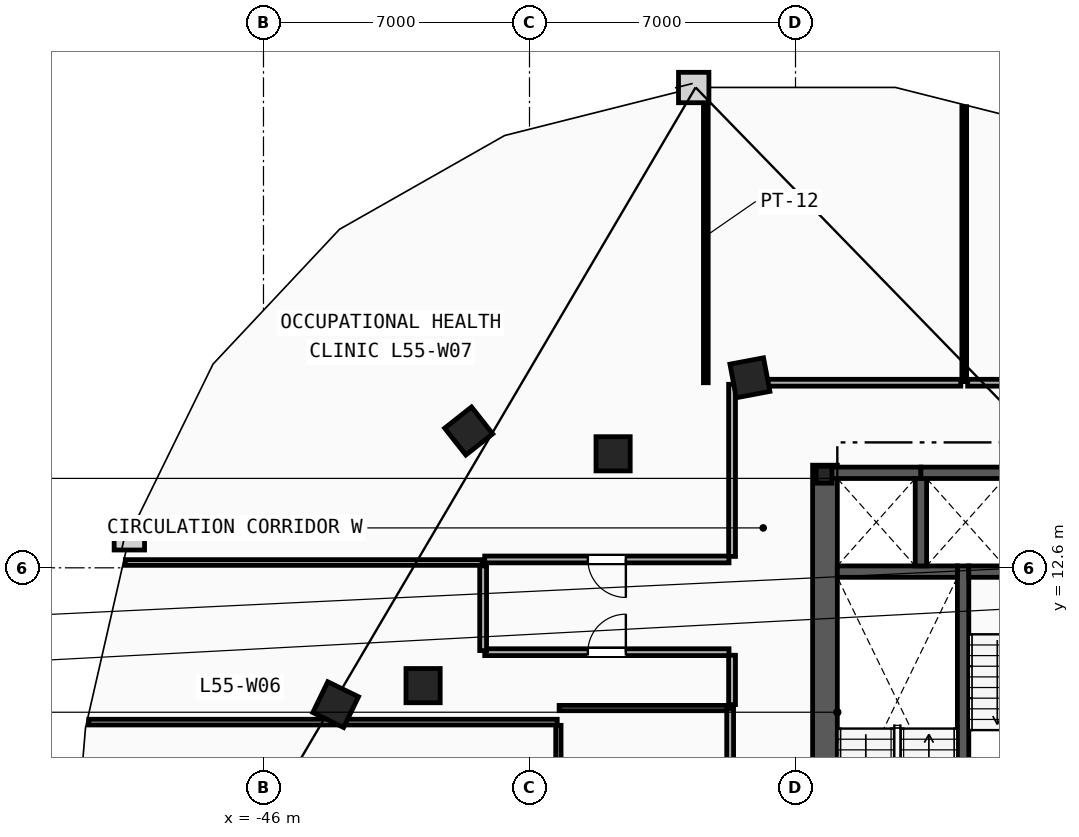
"""IFC4 building model, lengths in metres.
Left out: names, types, materials, properties, quantities, classifications, styles, units other than length and angle.
Written with IfcOpenShell. Run it as: python <this file> out.ifc"""

import sys

from ifc_helpers import new_model, si_unit, direction, frame, frame_2d, origin, origin_2d, place, context, subcontext, project, spatial, rectangle, i_section, extrude, element, fill, save


model = new_model("IFC4")
c1 = context("Model", 3, precision=1e-05, world=origin(), true_north=direction((0.0, 1.0)))
c2 = subcontext(c1, "Body", "Model", "MODEL_VIEW")
j1 = project(units=[si_unit("LENGTHUNIT", "METRE"), si_unit("PLANEANGLEUNIT", "RADIAN")], contexts=[c1])
p1 = place(None, origin())
s1 = spatial("IfcSite", under=j1, at=p1, CompositionType="ELEMENT")
p2 = place(p1, origin())
s2 = spatial("IfcBuilding", under=s1, at=p2, CompositionType="ELEMENT")
p3 = place(p2, frame((0.0, 0.0, 209.8)))
s3 = spatial("IfcBuildingStorey", under=s2, at=p3, CompositionType="ELEMENT", Elevation=209.8)
p4 = place(p3, frame((-31.25, 15.05, 0.0), z_axis=(0.0, 0.0, 1.0), x_axis=(1.0, 0.0, 0.0)))
e1 = element("IfcColumn", 1, at=p4, inside=s3, PredefinedType="COLUMN", context=c2, shape_type="SweptSolid", body=[
    extrude(i_section(OverallWidth=0.416, OverallDepth=0.446, WebThickness=0.039, FlangeThickness=0.063, FilletRadius=0.018, at=origin_2d()), origin(), (0.0, 0.0, 1.0), 3.6),
])
for number, where, z_axis, x_axis in (
    (2, (-41.8, 9.5, 0.0), (0.0, 0.0, 1.0), (1.0, 0.0, 0.0)),
    (3, (-36.8, 15.6, 0.0), (0.0, 0.0, 1.0), (1.0, 0.0, 0.0)),
    (4, (-33.2, 17.6, 0.0), (0.0, 0.0, 1.0), (-0.983, -0.186, 0.0)),
    (5, (-40.6, 16.2, 0.0), (0.0, 0.0, 1.0), (-0.785, -0.619, 0.0)),
    (6, (-44.1, 9.0, 0.0), (0.0, 0.0, 1.0), (-0.437, -0.899, 0.0)),
):
    element("IfcColumn", number, at=place(p3, frame(where, z_axis=z_axis, x_axis=x_axis)), inside=s3, PredefinedType="COLUMN", context=c2, shape_type="SweptSolid", body=[
        extrude(rectangle(XDim=0.9, YDim=0.9, at=origin_2d()), origin(), (0.0, 0.0, 1.0), 3.6),
    ])
p5 = place(p3, frame((-31.225, 1.97, 0.0), z_axis=(0.0, 0.0, 1.0), x_axis=(0.0, 1.0, 0.0)))
e7 = element("IfcWall", 7, at=p5, inside=s3, PredefinedType="SHEAR", context=c2, shape_type="SweptSolid", body=[
    extrude(rectangle(XDim=13.33, YDim=0.65, at=frame_2d((6.665, 0.0))), origin(), (0.0, 0.0, 1.0), 3.34),
])
p6 = place(p3, frame((-27.59, 1.97, 0.0), z_axis=(0.0, 0.0, 1.0), x_axis=(0.0, 1.0, 0.0)))
e8 = element("IfcWall", 8, at=p6, inside=s3, PredefinedType="SHEAR", context=c2, shape_type="SweptSolid", body=[
    extrude(rectangle(XDim=10.68, YDim=0.3, at=frame_2d((5.34, 0.0))), origin(), (0.0, 0.0, 1.0), 3.34),
])
p7 = place(p3, frame((-30.9, 12.5, 0.0), z_axis=(0.0, 0.0, 1.0), x_axis=(1.0, 0.0, 0.0)))
e9 = element("IfcWall", 9, at=p7, inside=s3, PredefinedType="SHEAR", context=c2, shape_type="SweptSolid", body=[
    extrude(rectangle(XDim=3.16, YDim=0.3, at=frame_2d((1.58, 0.0))), origin(), (0.0, 0.0, 1.0), 3.34),
])
p8 = place(p3, frame((-27.44, 12.5, 0.0), z_axis=(0.0, 0.0, 1.0), x_axis=(1.0, 0.0, 0.0)))
e10 = element("IfcWall", 10, at=p8, inside=s3, PredefinedType="SHEAR", context=c2, shape_type="SweptSolid", body=[
    extrude(rectangle(XDim=3.16, YDim=0.3, at=frame_2d((1.58, 0.0))), origin(), (0.0, 0.0, 1.0), 3.34),
])
p9 = place(p8, frame((1.03, 0.0, 0.0)))
e11 = element("IfcOpeningElement", 11, at=p9, cuts=e10, PredefinedType="OPENING", context=c2, shape_type="SweptSolid", body=[
    extrude(rectangle(XDim=1.1, YDim=2.15, at=frame_2d((0.55, 1.075))), frame((0.0, 0.16, 0.0), z_axis=(0.0, -1.0, 0.0), x_axis=(1.0, 0.0, 0.0)), (0.0, 0.0, 1.0), 0.32),
])
p10 = place(p3, frame((-31.2, 15.1, 0.0), z_axis=(0.0, 0.0, 1.0), x_axis=(1.0, 0.0, 0.0)))
e12 = element("IfcWall", 12, at=p10, inside=s3, PredefinedType="SHEAR", context=c2, shape_type="SweptSolid", body=[
    extrude(rectangle(XDim=2.5, YDim=0.3, at=frame_2d((1.25, 0.0))), origin(), (0.0, 0.0, 1.0), 3.34),
])
p11 = place(p3, frame((-28.7, 12.65, 0.0), z_axis=(0.0, 0.0, 1.0), x_axis=(0.0, 1.0, 0.0)))
e13 = element("IfcWall", 13, at=p11, inside=s3, PredefinedType="SHEAR", context=c2, shape_type="SweptSolid", body=[
    extrude(rectangle(XDim=2.3, YDim=0.3, at=frame_2d((1.15, 0.0))), origin(), (0.0, 0.0, 1.0), 3.34),
])
p12 = place(p3, frame((-28.7, 15.1, 0.0), z_axis=(0.0, 0.0, 1.0), x_axis=(1.0, 0.0, 0.0)))
e14 = element("IfcWall", 14, at=p12, inside=s3, PredefinedType="SHEAR", context=c2, shape_type="SweptSolid", body=[
    extrude(rectangle(XDim=2.5, YDim=0.3, at=frame_2d((1.25, 0.0))), origin(), (0.0, 0.0, 1.0), 3.34),
])
p13 = place(p3, frame((-38.24, 4.715, 0.0), z_axis=(0.0, 0.0, 1.0), x_axis=(0.0, 1.0, 0.0)))
e15 = element("IfcWall", 15, at=p13, inside=s3, PredefinedType="PARTITIONING", context=c2, shape_type="SweptSolid", body=[
    extrude(rectangle(XDim=3.74, YDim=0.14, at=frame_2d((1.87, 0.0))), origin(), (0.0, 0.0, 1.0), 3.34),
])
p14 = place(p3, frame((-38.22, 8.91, 0.0), z_axis=(0.0, 0.0, 1.0), x_axis=(1.0, 0.0, 0.0)))
e16 = element("IfcWall", 16, at=p14, inside=s3, PredefinedType="PARTITIONING", context=c2, shape_type="SweptSolid", body=[
    extrude(rectangle(XDim=4.48, YDim=0.14, at=frame_2d((2.24, 0.0))), origin(), (0.0, 0.0, 1.0), 3.34),
])
p15 = place(p3, frame((-33.72, 4.73, 0.0), z_axis=(0.0, 0.0, 1.0), x_axis=(0.0, 1.0, 0.0)))
e17 = element("IfcWall", 17, at=p15, inside=s3, PredefinedType="PARTITIONING", context=c2, shape_type="SweptSolid", body=[
    extrude(rectangle(XDim=4.16, YDim=0.18, at=frame_2d((2.08, 0.0))), origin(), (0.0, 0.0, 1.0), 3.34),
])
p16 = place(p15, frame((1.58, 0.0, 0.0)))
e18 = element("IfcOpeningElement", 18, at=p16, cuts=e17, PredefinedType="OPENING", context=c2, shape_type="SweptSolid", body=[
    extrude(rectangle(XDim=1.0, YDim=2.15, at=frame_2d((0.5, 1.075))), frame((0.0, 0.1, 0.0), z_axis=(0.0, -1.0, 0.0), x_axis=(1.0, 0.0, 0.0)), (0.0, 0.0, 1.0), 0.2),
])
p17 = place(p3, frame((-50.598, 8.54, 0.0), z_axis=(0.0, 0.0, 1.0), x_axis=(1.0, 0.0, 0.0)))
e19 = element("IfcWall", 19, at=p17, inside=s3, PredefinedType="PARTITIONING", context=c2, shape_type="SweptSolid", body=[
    extrude(rectangle(XDim=12.328, YDim=0.15, at=frame_2d((6.164, 0.0))), origin(), (0.0, 0.0, 1.0), 3.34),
])
p18 = place(p3, frame((-49.635, 12.74, 0.0), z_axis=(0.0, 0.0, 1.0), x_axis=(1.0, 0.0, 0.0)))
e20 = element("IfcWall", 20, at=p18, inside=s3, PredefinedType="PARTITIONING", context=c2, shape_type="SweptSolid", body=[
    extrude(rectangle(XDim=9.385, YDim=0.15, at=frame_2d((4.693, 0.0))), origin(), (0.0, 0.0, 1.0), 3.34),
])
p19 = place(p3, frame((-34.36, 17.47, 0.0), z_axis=(0.0, 0.0, 1.0), x_axis=(0.0, 1.0, 0.0)))
e21 = element("IfcWall", 21, at=p19, inside=s3, PredefinedType="PARTITIONING", context=c2, shape_type="SweptSolid", body=[
    extrude(rectangle(XDim=7.72, YDim=0.125, at=frame_2d((3.86, 0.0))), origin(), (0.0, 0.0, 1.0), 3.34),
])
p20 = place(p3, frame((-27.56, 17.5, 0.0), z_axis=(0.0, 0.0, 1.0), x_axis=(0.0, 1.0, 0.0)))
e22 = element("IfcWall", 22, at=p20, inside=s3, PredefinedType="PARTITIONING", context=c2, shape_type="SweptSolid", body=[
    extrude(rectangle(XDim=7.233, YDim=0.125, at=frame_2d((3.617, 0.0))), origin(), (0.0, 0.0, 1.0), 3.34),
])
p21 = place(p3, frame((-16.822, 17.47, 0.0), z_axis=(0.0, 0.0, 1.0), x_axis=(-1.0, 0.0, 0.0)))
e23 = element("IfcWall", 23, at=p21, inside=s3, PredefinedType="PARTITIONING", context=c2, shape_type="SweptSolid", body=[
    extrude(rectangle(XDim=10.648, YDim=0.18, at=frame_2d((5.324, 0.0))), origin(), (0.0, 0.0, 1.0), 3.34),
])
p22 = place(p21, frame((4.824, 0.0, 0.0)))
e24 = element("IfcOpeningElement", 24, at=p22, cuts=e23, PredefinedType="OPENING", context=c2, shape_type="SweptSolid", body=[
    extrude(rectangle(XDim=1.0, YDim=2.15, at=frame_2d((0.5, 1.075))), frame((0.0, 0.1, 0.0), z_axis=(0.0, -1.0, 0.0), x_axis=(1.0, 0.0, 0.0)), (0.0, 0.0, 1.0), 0.2),
])
p23 = place(p3, frame((-40.178, 10.38, 0.0), z_axis=(0.0, 0.0, 1.0), x_axis=(1.0, 0.0, 0.0)))
e25 = element("IfcWall", 25, at=p23, inside=s3, PredefinedType="PARTITIONING", context=c2, shape_type="SweptSolid", body=[
    extrude(rectangle(XDim=6.428, YDim=0.18, at=frame_2d((3.214, 0.0))), origin(), (0.0, 0.0, 1.0), 3.34),
])
p24 = place(p23, frame((2.714, 0.0, 0.0)))
e26 = element("IfcOpeningElement", 26, at=p24, cuts=e25, PredefinedType="OPENING", context=c2, shape_type="SweptSolid", body=[
    extrude(rectangle(XDim=1.0, YDim=2.15, at=frame_2d((0.5, 1.075))), frame((0.0, 0.1, 0.0), z_axis=(0.0, -1.0, 0.0), x_axis=(1.0, 0.0, 0.0)), (0.0, 0.0, 1.0), 0.2),
])
p25 = place(p3, frame((-40.22, 12.65, 0.0), z_axis=(0.0, 0.0, 1.0), x_axis=(0.0, -1.0, 0.0)))
e27 = element("IfcWall", 27, at=p25, inside=s3, PredefinedType="PARTITIONING", context=c2, shape_type="SweptSolid", body=[
    extrude(rectangle(XDim=2.229, YDim=0.18, at=frame_2d((1.114, 0.0))), origin(), (0.0, 0.0, 1.0), 3.34),
])
p26 = place(p3, frame((-33.67, 10.3, 0.0), z_axis=(0.0, 0.0, 1.0), x_axis=(0.0, -1.0, 0.0)))
e28 = element("IfcWall", 28, at=p26, inside=s3, PredefinedType="PARTITIONING", context=c2, shape_type="SweptSolid", body=[
    extrude(rectangle(XDim=1.299, YDim=0.18, at=frame_2d((0.649, 0.0))), origin(), (0.0, 0.0, 1.0), 3.34),
])
p27 = place(p3, frame((-33.75, 12.82, 0.0), z_axis=(0.0, 0.0, 1.0), x_axis=(-1.0, 0.0, 0.0)))
e29 = element("IfcWall", 29, at=p27, inside=s3, PredefinedType="PARTITIONING", context=c2, shape_type="SweptSolid", body=[
    extrude(rectangle(XDim=6.428, YDim=0.18, at=frame_2d((3.214, 0.0))), origin(), (0.0, 0.0, 1.0), 3.34),
])
p28 = place(p27, frame((2.714, 0.0, 0.0)))
e30 = element("IfcOpeningElement", 30, at=p28, cuts=e29, PredefinedType="OPENING", context=c2, shape_type="SweptSolid", body=[
    extrude(rectangle(XDim=1.0, YDim=2.15, at=frame_2d((0.5, 1.075))), frame((0.0, 0.1, 0.0), z_axis=(0.0, -1.0, 0.0), x_axis=(1.0, 0.0, 0.0)), (0.0, 0.0, 1.0), 0.2),
])
p29 = place(p3, frame((-27.65, 17.47, 0.0), z_axis=(0.0, 0.0, 1.0), x_axis=(-1.0, 0.0, 0.0)))
e31 = element("IfcWall", 31, at=p29, inside=s3, PredefinedType="PARTITIONING", context=c2, shape_type="SweptSolid", body=[
    extrude(rectangle(XDim=5.979, YDim=0.18, at=frame_2d((2.989, 0.0))), origin(), (0.0, 0.0, 1.0), 3.34),
])
p30 = place(p3, frame((-33.67, 17.428, 0.0), z_axis=(0.0, 0.0, 1.0), x_axis=(0.0, -1.0, 0.0)))
e32 = element("IfcWall", 32, at=p30, inside=s3, PredefinedType="PARTITIONING", context=c2, shape_type="SweptSolid", body=[
    extrude(rectangle(XDim=4.529, YDim=0.18, at=frame_2d((2.264, 0.0))), origin(), (0.0, 0.0, 1.0), 3.34),
])
p31 = place(p24, origin())
e33 = element("IfcDoor", 33, at=p31, inside=s3, OperationType="SINGLE_SWING_RIGHT", PredefinedType="DOOR", context=c2, shape_type="SweptSolid", body=[
    extrude(rectangle(XDim=1.0, YDim=2.15, at=frame_2d((0.5, 1.075))), frame((0.0, 0.025, 0.0), z_axis=(0.0, -1.0, 0.0), x_axis=(1.0, 0.0, 0.0)), (0.0, 0.0, 1.0), 0.05),
])
fill(e26, e33)
p32 = place(p28, origin())
e34 = element("IfcDoor", 34, at=p32, inside=s3, OperationType="SINGLE_SWING_LEFT", PredefinedType="DOOR", context=c2, shape_type="SweptSolid", body=[
    extrude(rectangle(XDim=1.0, YDim=2.15, at=frame_2d((0.5, 1.075))), frame((0.0, 0.025, 0.0), z_axis=(0.0, -1.0, 0.0), x_axis=(1.0, 0.0, 0.0)), (0.0, 0.0, 1.0), 0.05),
])
fill(e30, e34)
save(model, sys.argv[1])
